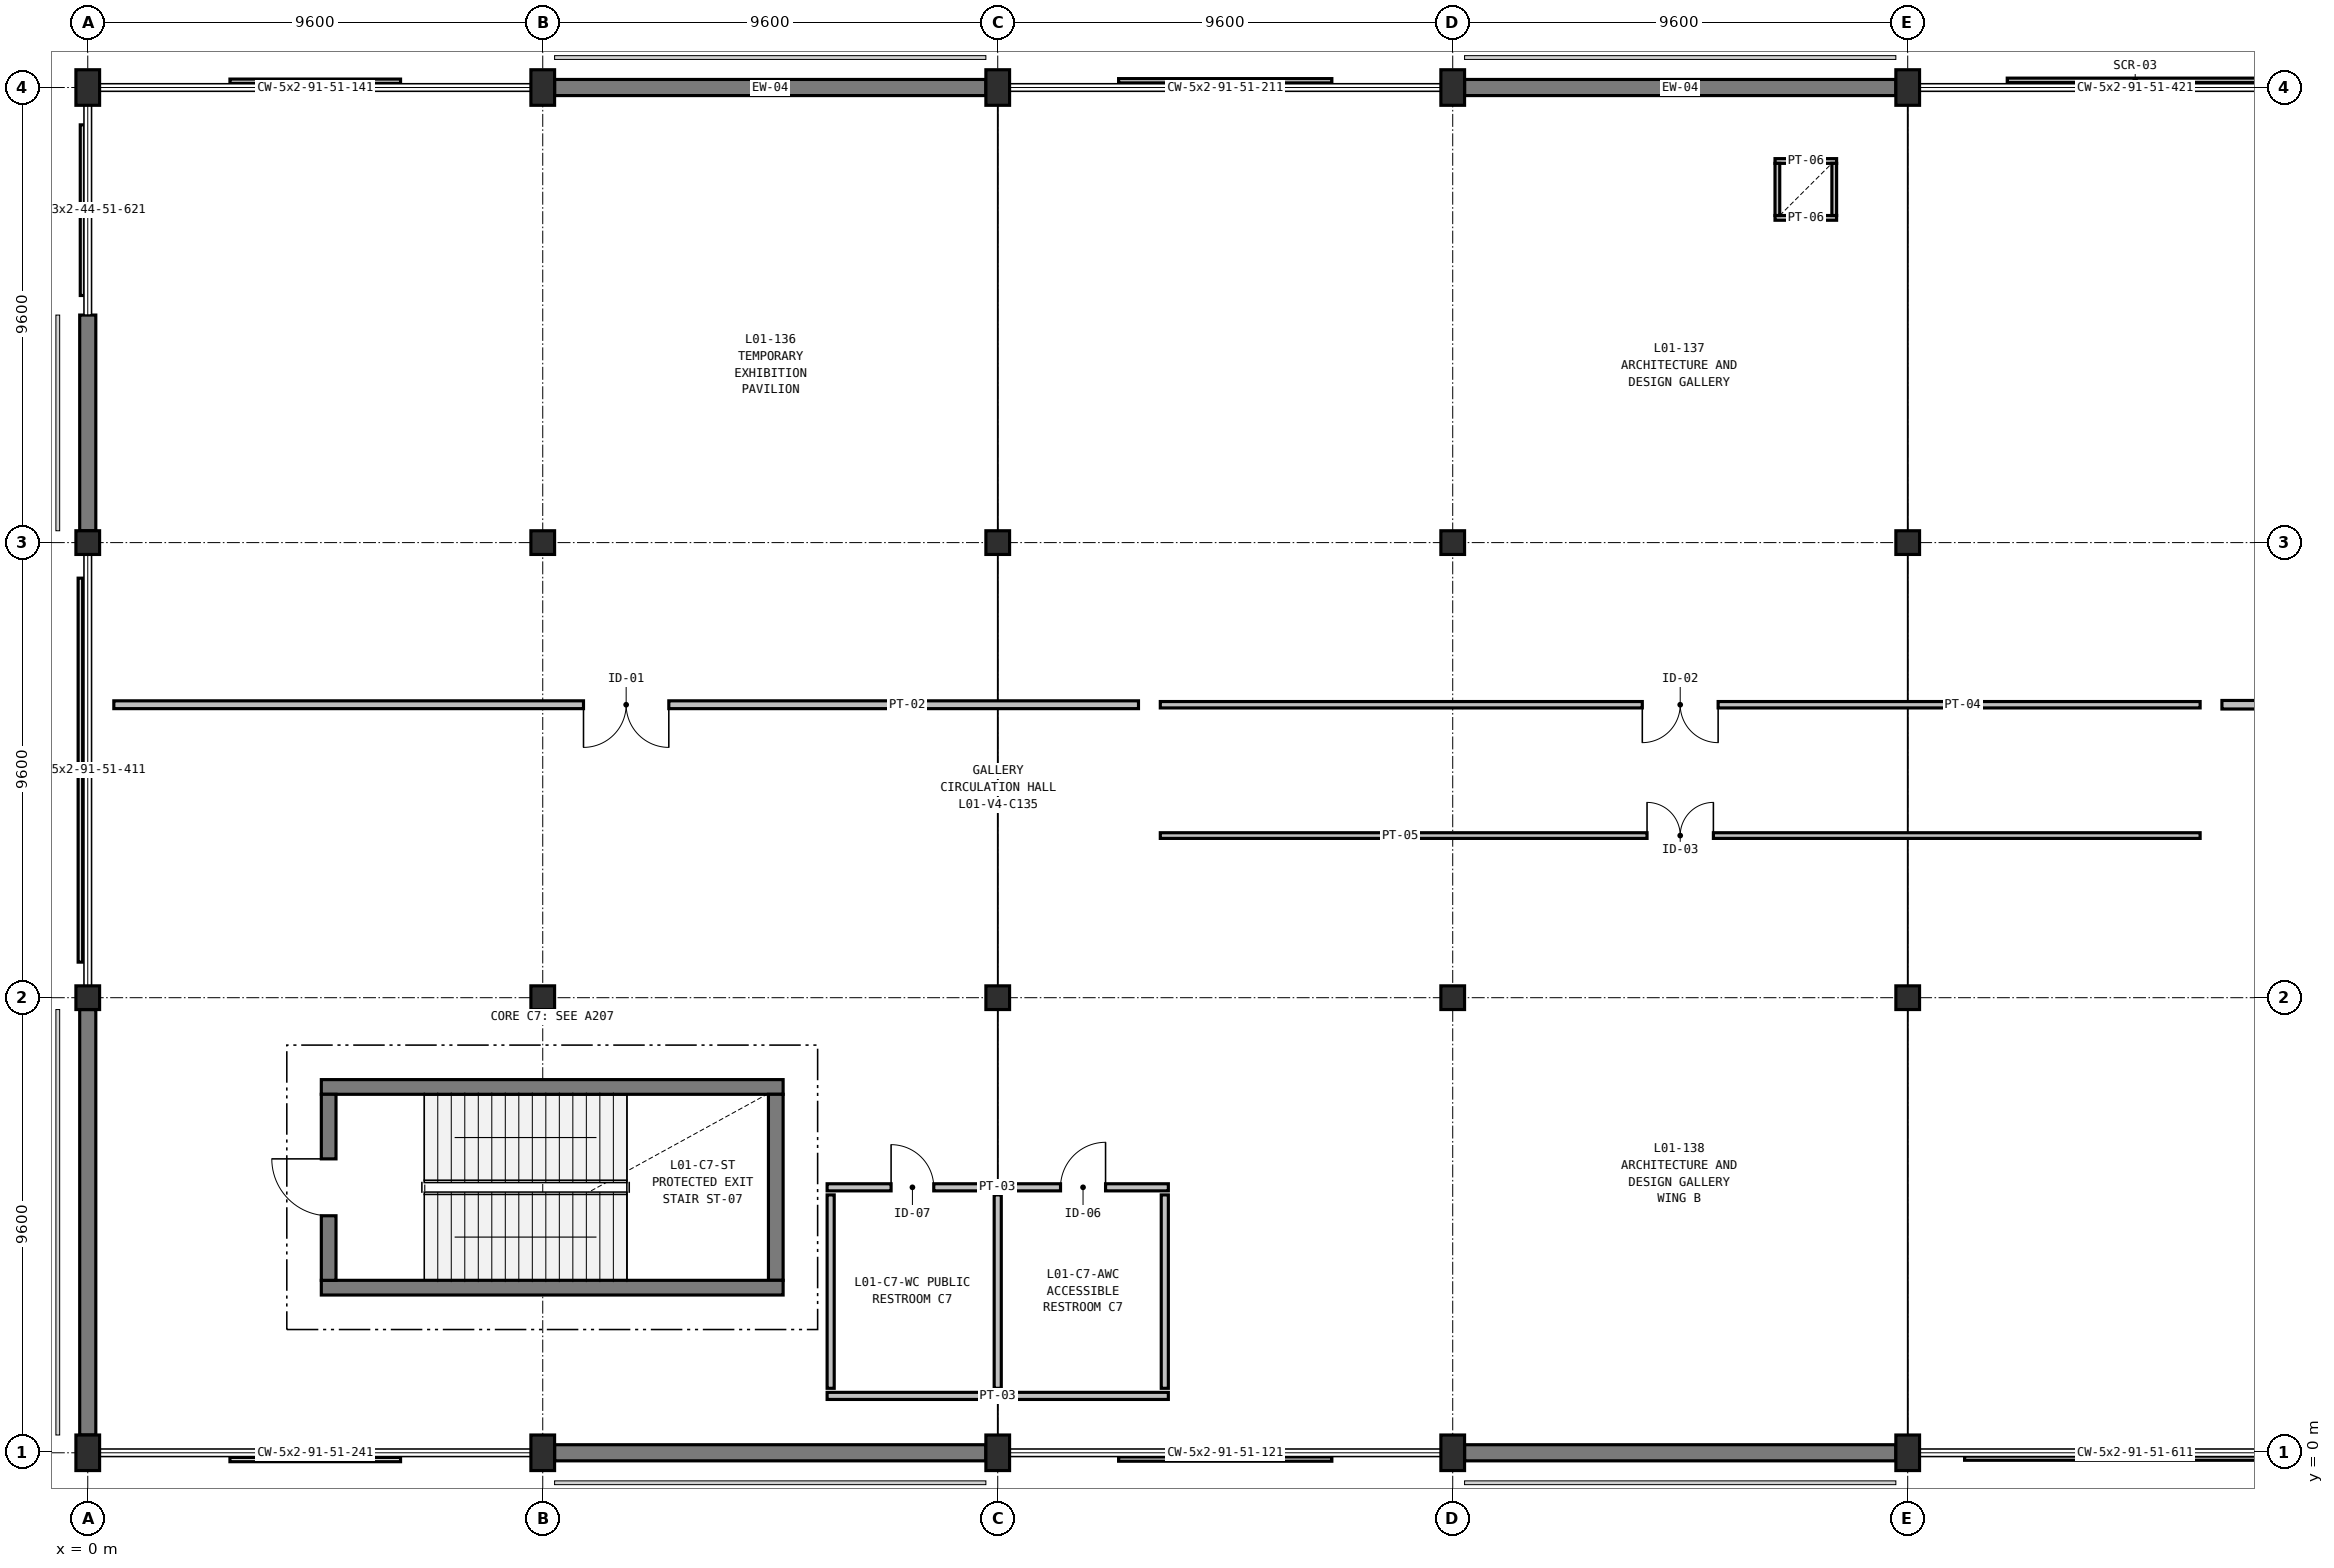
"""IFC4 building model, lengths in metres.
Left out: names, types, materials, properties, quantities, classifications, styles, units other than length and angle.
Written with IfcOpenShell. Run it as: python <this file> out.ifc"""

import sys

from ifc_helpers import new_model, si_unit, direction, frame, frame_2d, origin, origin_with_axes, origin_2d, place, context, subcontext, project, spatial, rectangle, extrude, element, fill, save


model = new_model("IFC4")
c1 = context("Model", 3, precision=1e-05, world=origin(), true_north=direction((0.0, 1.0)))
c2 = subcontext(c1, "Body", "Model", "MODEL_VIEW")
j1 = project(units=[si_unit("LENGTHUNIT", "METRE"), si_unit("PLANEANGLEUNIT", "RADIAN")], contexts=[c1])
p1 = place(None, origin())
s1 = spatial("IfcSite", under=j1, at=p1, CompositionType="ELEMENT")
p2 = place(p1, origin())
s2 = spatial("IfcBuilding", under=s1, at=p2, CompositionType="ELEMENT")
p3 = place(p2, frame((0.0, 0.0, 6.0)))
s3 = spatial("IfcBuildingStorey", under=s2, at=p3, CompositionType="ELEMENT", Elevation=6.0)
p4 = place(p3, origin_with_axes())
e1 = element("IfcColumn", 1, at=p4, inside=s3, PredefinedType="COLUMN", context=c2, shape_type="SweptSolid", body=[
    extrude(rectangle(XDim=0.5, YDim=0.75, at=origin_2d()), origin(), (0.0, 0.0, 1.0), 5.4),
])
for number, where, z_axis, x_axis in (
    (2, (0.0, 9.6, 0.0), (0.0, 0.0, 1.0), (1.0, 0.0, 0.0)),
    (3, (0.0, 19.2, 0.0), (0.0, 0.0, 1.0), (1.0, 0.0, 0.0)),
):
    element("IfcColumn", number, at=place(p3, frame(where, z_axis=z_axis, x_axis=x_axis)), inside=s3, PredefinedType="COLUMN", context=c2, shape_type="SweptSolid", body=[
        extrude(rectangle(XDim=0.5, YDim=0.5, at=origin_2d()), origin(), (0.0, 0.0, 1.0), 5.4),
    ])
for number, where, z_axis, x_axis in (
    (4, (0.0, 28.8, 0.0), (0.0, 0.0, 1.0), (1.0, 0.0, 0.0)),
    (5, (9.6, 0.0, 0.0), (0.0, 0.0, 1.0), (1.0, 0.0, 0.0)),
):
    element("IfcColumn", number, at=place(p3, frame(where, z_axis=z_axis, x_axis=x_axis)), inside=s3, PredefinedType="COLUMN", context=c2, shape_type="SweptSolid", body=[
        extrude(rectangle(XDim=0.5, YDim=0.75, at=origin_2d()), origin(), (0.0, 0.0, 1.0), 5.4),
    ])
for number, where, z_axis, x_axis in (
    (6, (9.6, 9.6, 0.0), (0.0, 0.0, 1.0), (1.0, 0.0, 0.0)),
    (7, (9.6, 19.2, 0.0), (0.0, 0.0, 1.0), (1.0, 0.0, 0.0)),
):
    element("IfcColumn", number, at=place(p3, frame(where, z_axis=z_axis, x_axis=x_axis)), inside=s3, PredefinedType="COLUMN", context=c2, shape_type="SweptSolid", body=[
        extrude(rectangle(XDim=0.5, YDim=0.5, at=origin_2d()), origin(), (0.0, 0.0, 1.0), 5.4),
    ])
for number, where, z_axis, x_axis in (
    (8, (9.6, 28.8, 0.0), (0.0, 0.0, 1.0), (1.0, 0.0, 0.0)),
    (9, (19.2, 0.0, 0.0), (0.0, 0.0, 1.0), (1.0, 0.0, 0.0)),
):
    element("IfcColumn", number, at=place(p3, frame(where, z_axis=z_axis, x_axis=x_axis)), inside=s3, PredefinedType="COLUMN", context=c2, shape_type="SweptSolid", body=[
        extrude(rectangle(XDim=0.5, YDim=0.75, at=origin_2d()), origin(), (0.0, 0.0, 1.0), 5.4),
    ])
for number, where, z_axis, x_axis in (
    (10, (19.2, 9.6, 0.0), (0.0, 0.0, 1.0), (1.0, 0.0, 0.0)),
    (11, (19.2, 19.2, 0.0), (0.0, 0.0, 1.0), (1.0, 0.0, 0.0)),
):
    element("IfcColumn", number, at=place(p3, frame(where, z_axis=z_axis, x_axis=x_axis)), inside=s3, PredefinedType="COLUMN", context=c2, shape_type="SweptSolid", body=[
        extrude(rectangle(XDim=0.5, YDim=0.5, at=origin_2d()), origin(), (0.0, 0.0, 1.0), 5.4),
    ])
for number, where, z_axis, x_axis in (
    (12, (19.2, 28.8, 0.0), (0.0, 0.0, 1.0), (1.0, 0.0, 0.0)),
    (13, (28.8, 0.0, 0.0), (0.0, 0.0, 1.0), (1.0, 0.0, 0.0)),
):
    element("IfcColumn", number, at=place(p3, frame(where, z_axis=z_axis, x_axis=x_axis)), inside=s3, PredefinedType="COLUMN", context=c2, shape_type="SweptSolid", body=[
        extrude(rectangle(XDim=0.5, YDim=0.75, at=origin_2d()), origin(), (0.0, 0.0, 1.0), 5.4),
    ])
for number, where, z_axis, x_axis in (
    (14, (28.8, 9.6, 0.0), (0.0, 0.0, 1.0), (1.0, 0.0, 0.0)),
    (15, (28.8, 19.2, 0.0), (0.0, 0.0, 1.0), (1.0, 0.0, 0.0)),
):
    element("IfcColumn", number, at=place(p3, frame(where, z_axis=z_axis, x_axis=x_axis)), inside=s3, PredefinedType="COLUMN", context=c2, shape_type="SweptSolid", body=[
        extrude(rectangle(XDim=0.5, YDim=0.5, at=origin_2d()), origin(), (0.0, 0.0, 1.0), 5.4),
    ])
for number, where, z_axis, x_axis in (
    (16, (28.8, 28.8, 0.0), (0.0, 0.0, 1.0), (1.0, 0.0, 0.0)),
    (17, (38.4, 0.0, 0.0), (0.0, 0.0, 1.0), (1.0, 0.0, 0.0)),
):
    element("IfcColumn", number, at=place(p3, frame(where, z_axis=z_axis, x_axis=x_axis)), inside=s3, PredefinedType="COLUMN", context=c2, shape_type="SweptSolid", body=[
        extrude(rectangle(XDim=0.5, YDim=0.75, at=origin_2d()), origin(), (0.0, 0.0, 1.0), 5.4),
    ])
for number, where, z_axis, x_axis in (
    (18, (38.4, 9.6, 0.0), (0.0, 0.0, 1.0), (1.0, 0.0, 0.0)),
    (19, (38.4, 19.2, 0.0), (0.0, 0.0, 1.0), (1.0, 0.0, 0.0)),
):
    element("IfcColumn", number, at=place(p3, frame(where, z_axis=z_axis, x_axis=x_axis)), inside=s3, PredefinedType="COLUMN", context=c2, shape_type="SweptSolid", body=[
        extrude(rectangle(XDim=0.5, YDim=0.5, at=origin_2d()), origin(), (0.0, 0.0, 1.0), 5.4),
    ])
p5 = place(p3, frame((38.4, 28.8, 0.0), z_axis=(0.0, 0.0, 1.0), x_axis=(1.0, 0.0, 0.0)))
e20 = element("IfcColumn", 20, at=p5, inside=s3, PredefinedType="COLUMN", context=c2, shape_type="SweptSolid", body=[
    extrude(rectangle(XDim=0.5, YDim=0.75, at=origin_2d()), origin(), (0.0, 0.0, 1.0), 5.4),
])
for number, where, z_axis, x_axis in (
    (21, (9.85, 28.8, 0.0), (0.0, 0.0, 1.0), (1.0, 0.0, 0.0)),
    (22, (29.05, 28.8, 0.0), (0.0, 0.0, 1.0), (1.0, 0.0, 0.0)),
    (23, (38.15, 0.0, 0.0), (0.0, 0.0, 1.0), (-1.0, 0.0, 0.0)),
    (24, (18.95, 0.0, 0.0), (0.0, 0.0, 1.0), (-1.0, 0.0, 0.0)),
):
    element("IfcWall", number, at=place(p3, frame(where, z_axis=z_axis, x_axis=x_axis)), inside=s3, PredefinedType="SOLIDWALL", context=c2, shape_type="SweptSolid", body=[
        extrude(rectangle(XDim=9.1, YDim=0.34, at=frame_2d((4.55, 0.0))), origin(), (0.0, 0.0, 1.0), 5.08),
    ])
p6 = place(p3, frame((0.0, 0.375, 0.0), z_axis=(0.0, 0.0, 1.0), x_axis=(0.0, 1.0, 0.0)))
e25 = element("IfcWall", 25, at=p6, inside=s3, PredefinedType="SOLIDWALL", context=c2, shape_type="SweptSolid", body=[
    extrude(rectangle(XDim=8.975, YDim=0.34, at=frame_2d((4.488, 0.0))), origin(), (0.0, 0.0, 1.0), 5.08),
])
p7 = place(p3, frame((0.0, 19.45, 0.0), z_axis=(0.0, 0.0, 1.0), x_axis=(0.0, 1.0, 0.0)))
e26 = element("IfcWall", 26, at=p7, inside=s3, PredefinedType="SOLIDWALL", context=c2, shape_type="SweptSolid", body=[
    extrude(rectangle(XDim=4.55, YDim=0.34, at=frame_2d((2.275, 0.0))), origin(), (0.0, 0.0, 1.0), 5.08),
])
p8 = place(p3, frame((4.928, 7.717, 0.0), z_axis=(0.0, 0.0, 1.0), x_axis=(1.0, 0.0, 0.0)))
e27 = element("IfcWall", 27, at=p8, inside=s3, PredefinedType="SHEAR", context=c2, shape_type="SweptSolid", body=[
    extrude(rectangle(XDim=9.744, YDim=0.31, at=frame_2d((4.872, 0.0))), origin(), (0.0, 0.0, 1.0), 5.08),
])
p9 = place(p3, frame((14.517, 7.562, 0.0), z_axis=(0.0, 0.0, 1.0), x_axis=(0.0, -1.0, 0.0)))
e28 = element("IfcWall", 28, at=p9, inside=s3, PredefinedType="SHEAR", context=c2, shape_type="SweptSolid", body=[
    extrude(rectangle(XDim=3.924, YDim=0.31, at=frame_2d((1.962, 0.0))), origin(), (0.0, 0.0, 1.0), 5.08),
])
p10 = place(p3, frame((14.672, 3.483, 0.0), z_axis=(0.0, 0.0, 1.0), x_axis=(-1.0, 0.0, 0.0)))
e29 = element("IfcWall", 29, at=p10, inside=s3, PredefinedType="SHEAR", context=c2, shape_type="SweptSolid", body=[
    extrude(rectangle(XDim=9.744, YDim=0.31, at=frame_2d((4.872, 0.0))), origin(), (0.0, 0.0, 1.0), 5.08),
])
p11 = place(p3, frame((5.083, 3.638, 0.0), z_axis=(0.0, 0.0, 1.0), x_axis=(0.0, 1.0, 0.0)))
e30 = element("IfcWall", 30, at=p11, inside=s3, PredefinedType="SHEAR", context=c2, shape_type="SweptSolid", body=[
    extrude(rectangle(XDim=3.924, YDim=0.31, at=frame_2d((1.962, 0.0))), origin(), (0.0, 0.0, 1.0), 5.08),
])
p12 = place(p11, frame((1.362, 0.0, 0.0)))
e31 = element("IfcOpeningElement", 31, at=p12, cuts=e30, PredefinedType="OPENING", context=c2, shape_type="SweptSolid", body=[
    extrude(rectangle(XDim=1.2, YDim=2.2, at=frame_2d((0.6, 1.1))), frame((0.0, 0.165, 0.0), z_axis=(0.0, -1.0, 0.0), x_axis=(1.0, 0.0, 0.0)), (0.0, 0.0, 1.0), 0.33),
])
p13 = place(p3, frame((15.6, 5.6, 0.0), z_axis=(0.0, 0.0, 1.0), x_axis=(1.0, 0.0, 0.0)))
e32 = element("IfcWall", 32, at=p13, inside=s3, PredefinedType="PARTITIONING", context=c2, shape_type="SweptSolid", body=[
    extrude(rectangle(XDim=7.2, YDim=0.15, at=frame_2d((3.6, 0.0))), origin(), (0.0, 0.0, 1.0), 4.255),
])
p14 = place(p13, frame((1.35, 0.0, 0.0)))
e33 = element("IfcOpeningElement", 33, at=p14, cuts=e32, PredefinedType="OPENING", context=c2, shape_type="SweptSolid", body=[
    extrude(rectangle(XDim=0.9, YDim=2.1, at=frame_2d((0.45, 1.05))), frame((0.0, 0.085, 0.0), z_axis=(0.0, -1.0, 0.0), x_axis=(1.0, 0.0, 0.0)), (0.0, 0.0, 1.0), 0.17),
])
p15 = place(p13, frame((4.925, 0.0, 0.0)))
e34 = element("IfcOpeningElement", 34, at=p15, cuts=e32, PredefinedType="OPENING", context=c2, shape_type="SweptSolid", body=[
    extrude(rectangle(XDim=0.95, YDim=2.15, at=frame_2d((0.475, 1.075))), frame((0.0, 0.085, 0.0), z_axis=(0.0, -1.0, 0.0), x_axis=(1.0, 0.0, 0.0)), (0.0, 0.0, 1.0), 0.17),
])
p16 = place(p3, frame((15.6, 1.2, 0.0), z_axis=(0.0, 0.0, 1.0), x_axis=(1.0, 0.0, 0.0)))
e35 = element("IfcWall", 35, at=p16, inside=s3, PredefinedType="PARTITIONING", context=c2, shape_type="SweptSolid", body=[
    extrude(rectangle(XDim=7.2, YDim=0.15, at=frame_2d((3.6, 0.0))), origin(), (0.0, 0.0, 1.0), 4.255),
])
p17 = place(p3, frame((15.675, 1.36, 0.0), z_axis=(0.0, 0.0, 1.0), x_axis=(0.0, 1.0, 0.0)))
e36 = element("IfcWall", 36, at=p17, inside=s3, PredefinedType="PARTITIONING", context=c2, shape_type="SweptSolid", body=[
    extrude(rectangle(XDim=4.08, YDim=0.15, at=frame_2d((2.04, 0.0))), origin(), (0.0, 0.0, 1.0), 5.08),
])
p18 = place(p3, frame((19.2, 1.36, 0.0), z_axis=(0.0, 0.0, 1.0), x_axis=(0.0, 1.0, 0.0)))
e37 = element("IfcWall", 37, at=p18, inside=s3, PredefinedType="PARTITIONING", context=c2, shape_type="SweptSolid", body=[
    extrude(rectangle(XDim=4.08, YDim=0.15, at=frame_2d((2.04, 0.0))), origin(), (0.0, 0.0, 1.0), 4.255),
])
p19 = place(p3, frame((22.725, 1.36, 0.0), z_axis=(0.0, 0.0, 1.0), x_axis=(0.0, 1.0, 0.0)))
e38 = element("IfcWall", 38, at=p19, inside=s3, PredefinedType="PARTITIONING", context=c2, shape_type="SweptSolid", body=[
    extrude(rectangle(XDim=4.08, YDim=0.15, at=frame_2d((2.04, 0.0))), origin(), (0.0, 0.0, 1.0), 4.455),
])
for number, where, z_axis, x_axis in (
    (39, (35.6, 27.25, 0.0), (0.0, 0.0, 1.0), (1.0, 0.0, 0.0)),
    (40, (36.9, 26.05, 0.0), (0.0, 0.0, 1.0), (-1.0, 0.0, 0.0)),
):
    element("IfcWall", number, at=place(p3, frame(where, z_axis=z_axis, x_axis=x_axis)), inside=s3, PredefinedType="PARTITIONING", context=c2, shape_type="SweptSolid", body=[
        extrude(rectangle(XDim=1.3, YDim=0.1, at=frame_2d((0.65, 0.0))), origin(), (0.0, 0.0, 1.0), 5.08),
    ])
for number, where, z_axis, x_axis in (
    (41, (35.65, 26.1, 0.0), (0.0, 0.0, 1.0), (0.0, 1.0, 0.0)),
    (42, (36.85, 27.2, 0.0), (0.0, 0.0, 1.0), (0.0, -1.0, 0.0)),
):
    element("IfcWall", number, at=place(p3, frame(where, z_axis=z_axis, x_axis=x_axis)), inside=s3, PredefinedType="PARTITIONING", context=c2, shape_type="SweptSolid", body=[
        extrude(rectangle(XDim=1.1, YDim=0.1, at=frame_2d((0.55, 0.0))), origin(), (0.0, 0.0, 1.0), 5.08),
    ])
p20 = place(p3, frame((22.17, 15.78, 0.0), z_axis=(0.0, 0.0, 1.0), x_axis=(-1.0, 0.0, 0.0)))
e43 = element("IfcWall", 43, at=p20, inside=s3, PredefinedType="PARTITIONING", context=c2, shape_type="SweptSolid", body=[
    extrude(rectangle(XDim=21.62, YDim=0.165, at=frame_2d((10.81, 0.0))), origin(), (0.0, 0.0, 1.0), 4.255),
])
p21 = place(p20, frame((9.91, 0.0, 0.0)))
e44 = element("IfcOpeningElement", 44, at=p21, cuts=e43, PredefinedType="OPENING", context=c2, shape_type="SweptSolid", body=[
    extrude(rectangle(XDim=1.8, YDim=2.4, at=frame_2d((0.9, 1.2))), frame((0.0, 0.093, 0.0), z_axis=(0.0, -1.0, 0.0), x_axis=(1.0, 0.0, 0.0)), (0.0, 0.0, 1.0), 0.185),
])
p22 = place(p3, frame((44.57, 15.78, 0.0), z_axis=(0.0, 0.0, 1.0), x_axis=(-1.0, 0.0, 0.0)))
e45 = element("IfcWall", 45, at=p22, inside=s3, PredefinedType="PARTITIONING", context=c2, shape_type="SweptSolid", body=[
    extrude(rectangle(XDim=21.94, YDim=0.135, at=frame_2d((10.97, 0.0))), origin(), (0.0, 0.0, 1.0), 4.255),
])
p23 = place(p22, frame((10.17, 0.0, 0.0)))
e46 = element("IfcOpeningElement", 46, at=p23, cuts=e45, PredefinedType="OPENING", context=c2, shape_type="SweptSolid", body=[
    extrude(rectangle(XDim=1.6, YDim=2.35, at=frame_2d((0.8, 1.175))), frame((0.0, 0.077, 0.0), z_axis=(0.0, -1.0, 0.0), x_axis=(1.0, 0.0, 0.0)), (0.0, 0.0, 1.0), 0.155),
])
p24 = place(p3, frame((22.63, 13.02, 0.0), z_axis=(0.0, 0.0, 1.0), x_axis=(1.0, 0.0, 0.0)))
e47 = element("IfcWall", 47, at=p24, inside=s3, PredefinedType="PARTITIONING", context=c2, shape_type="SweptSolid", body=[
    extrude(rectangle(XDim=21.94, YDim=0.12, at=frame_2d((10.97, 0.0))), origin(), (0.0, 0.0, 1.0), 4.255),
])
p25 = place(p24, frame((10.27, 0.0, 0.0)))
e48 = element("IfcOpeningElement", 48, at=p25, cuts=e47, PredefinedType="OPENING", context=c2, shape_type="SweptSolid", body=[
    extrude(rectangle(XDim=1.4, YDim=2.3, at=frame_2d((0.7, 1.15))), frame((0.0, 0.07, 0.0), z_axis=(0.0, -1.0, 0.0), x_axis=(1.0, 0.0, 0.0)), (0.0, 0.0, 1.0), 0.14),
])
p26 = place(p3, frame((66.65, 15.78, 0.0), z_axis=(0.0, 0.0, 1.0), x_axis=(-1.0, 0.0, 0.0)))
e49 = element("IfcWall", 49, at=p26, inside=s3, PredefinedType="PARTITIONING", context=c2, shape_type="SweptSolid", body=[
    extrude(rectangle(XDim=21.62, YDim=0.18, at=frame_2d((10.81, 0.0))), origin(), (0.0, 0.0, 1.0), 4.255),
])
p27 = place(p26, frame((10.285, 0.0, 0.0)))
e50 = element("IfcOpeningElement", 50, at=p27, cuts=e49, PredefinedType="OPENING", context=c2, shape_type="SweptSolid", body=[
    extrude(rectangle(XDim=1.05, YDim=2.2, at=frame_2d((0.525, 1.1))), frame((0.0, 0.1, 0.0), z_axis=(0.0, -1.0, 0.0), x_axis=(1.0, 0.0, 0.0)), (0.0, 0.0, 1.0), 0.2),
])
p28 = place(p12, origin())
e51 = element("IfcDoor", 51, at=p28, inside=s3, OperationType="SINGLE_SWING_RIGHT", PredefinedType="DOOR", context=c2, shape_type="SweptSolid", body=[
    extrude(rectangle(XDim=1.2, YDim=2.2, at=frame_2d((0.6, 1.1))), frame((0.0, 0.025, 0.0), z_axis=(0.0, -1.0, 0.0), x_axis=(1.0, 0.0, 0.0)), (0.0, 0.0, 1.0), 0.05),
])
fill(e31, e51)
p29 = place(p14, origin())
e52 = element("IfcDoor", 52, at=p29, inside=s3, OperationType="SINGLE_SWING_LEFT", PredefinedType="DOOR", context=c2, shape_type="SweptSolid", body=[
    extrude(rectangle(XDim=0.9, YDim=2.1, at=frame_2d((0.45, 1.05))), frame((0.0, 0.025, 0.0), z_axis=(0.0, -1.0, 0.0), x_axis=(1.0, 0.0, 0.0)), (0.0, 0.0, 1.0), 0.05),
])
fill(e33, e52)
p30 = place(p15, origin())
e53 = element("IfcDoor", 53, at=p30, inside=s3, OperationType="SINGLE_SWING_RIGHT", PredefinedType="DOOR", context=c2, shape_type="SweptSolid", body=[
    extrude(rectangle(XDim=0.95, YDim=2.15, at=frame_2d((0.475, 1.075))), frame((0.0, 0.025, 0.0), z_axis=(0.0, -1.0, 0.0), x_axis=(1.0, 0.0, 0.0)), (0.0, 0.0, 1.0), 0.05),
])
fill(e34, e53)
p31 = place(p21, origin())
e54 = element("IfcDoor", 54, at=p31, inside=s3, OperationType="DOUBLE_DOOR_SINGLE_SWING", PredefinedType="DOOR", context=c2, shape_type="SweptSolid", body=[
    extrude(rectangle(XDim=1.8, YDim=2.4, at=frame_2d((0.9, 1.2))), frame((0.0, 0.025, 0.0), z_axis=(0.0, -1.0, 0.0), x_axis=(1.0, 0.0, 0.0)), (0.0, 0.0, 1.0), 0.05),
])
fill(e44, e54)
p32 = place(p23, origin())
e55 = element("IfcDoor", 55, at=p32, inside=s3, OperationType="DOUBLE_DOOR_SINGLE_SWING", PredefinedType="DOOR", context=c2, shape_type="SweptSolid", body=[
    extrude(rectangle(XDim=1.6, YDim=2.35, at=frame_2d((0.8, 1.175))), frame((0.0, 0.025, 0.0), z_axis=(0.0, -1.0, 0.0), x_axis=(1.0, 0.0, 0.0)), (0.0, 0.0, 1.0), 0.05),
])
fill(e46, e55)
p33 = place(p25, origin())
e56 = element("IfcDoor", 56, at=p33, inside=s3, OperationType="DOUBLE_DOOR_SINGLE_SWING", PredefinedType="DOOR", context=c2, shape_type="SweptSolid", body=[
    extrude(rectangle(XDim=1.4, YDim=2.3, at=frame_2d((0.7, 1.15))), frame((0.0, 0.025, 0.0), z_axis=(0.0, -1.0, 0.0), x_axis=(1.0, 0.0, 0.0)), (0.0, 0.0, 1.0), 0.05),
])
fill(e48, e56)
save(model, sys.argv[1])
